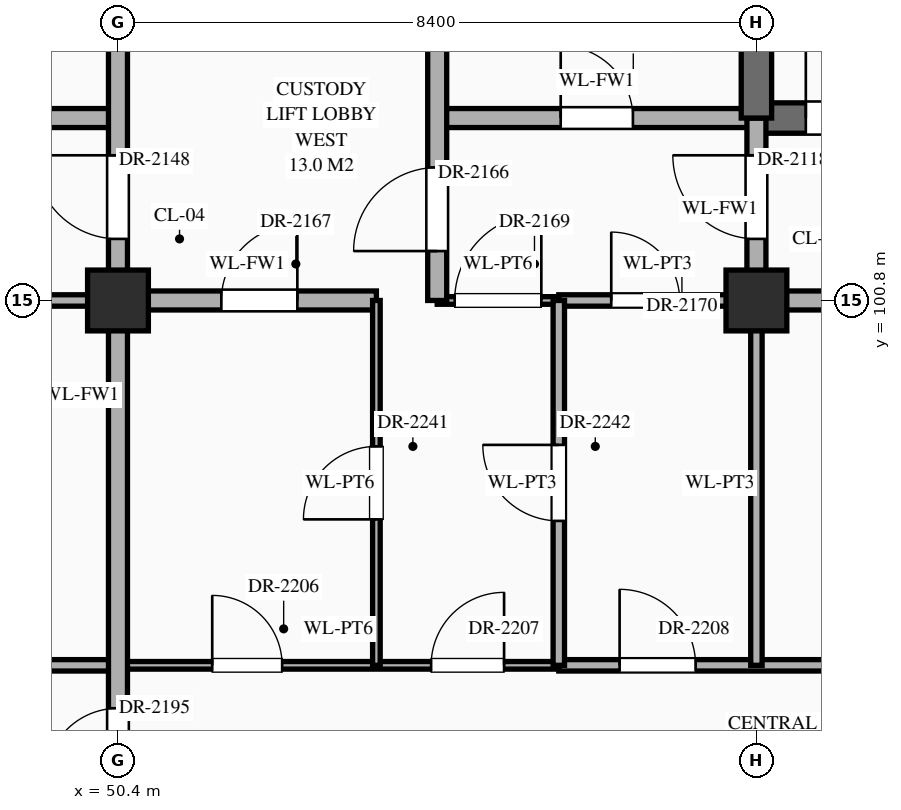
"""IFC4 building model, lengths in metres.
Left out: names, types, materials, properties, quantities, classifications, styles, units other than length and angle.
Written with IfcOpenShell. Run it as: python <this file> out.ifc"""

import sys

from ifc_helpers import new_model, si_unit, direction, frame, frame_2d, origin, origin_2d, place, context, subcontext, project, spatial, rectangle, extrude, element, fill, save


model = new_model("IFC4")
c1 = context("Model", 3, precision=1e-05, world=origin(), true_north=direction((0.0, 1.0)))
c2 = subcontext(c1, "Body", "Model", "MODEL_VIEW")
j1 = project(units=[si_unit("LENGTHUNIT", "METRE"), si_unit("PLANEANGLEUNIT", "RADIAN")], contexts=[c1])
p1 = place(None, origin())
s1 = spatial("IfcSite", under=j1, at=p1, CompositionType="ELEMENT")
p2 = place(p1, origin())
s2 = spatial("IfcBuilding", under=s1, at=p2, CompositionType="ELEMENT")
p3 = place(p2, frame((0.0, 0.0, 26.1)))
s3 = spatial("IfcBuildingStorey", under=s2, at=p3, CompositionType="ELEMENT", Elevation=26.1)
for number, where, z_axis, x_axis in (
    (1, (50.4, 100.8, 0.0), (0.0, 0.0, 1.0), (1.0, 0.0, 0.0)),
    (2, (58.8, 100.8, 0.0), (0.0, 0.0, 1.0), (1.0, 0.0, 0.0)),
):
    element("IfcColumn", number, at=place(p3, frame(where, z_axis=z_axis, x_axis=x_axis)), inside=s3, PredefinedType="COLUMN", context=c2, shape_type="SweptSolid", body=[
        extrude(rectangle(XDim=0.8, YDim=0.8, at=origin_2d()), origin(), (0.0, 0.0, 1.0), 4.5),
    ])
p4 = place(p3, frame((31.0, 96.0, 0.0), z_axis=(0.0, 0.0, 1.0), x_axis=(1.0, 0.0, 0.0)))
e3 = element("IfcWall", 3, at=p4, inside=s3, PredefinedType="STANDARD", context=c2, shape_type="SweptSolid", body=[
    extrude(rectangle(XDim=19.4, YDim=0.15, at=frame_2d((9.7, 0.0))), origin(), (0.0, 0.0, 1.0), 4.24),
])
p5 = place(p4, frame((0.66, 0.0, 0.0)))
e4 = element("IfcOpeningElement", 4, at=p5, cuts=e3, PredefinedType="OPENING", context=c2, shape_type="SweptSolid", body=[
    extrude(rectangle(XDim=1.28, YDim=2.35, at=frame_2d((0.64, 1.175))), frame((0.0, 0.087, 0.0), z_axis=(0.0, -1.0, 0.0), x_axis=(1.0, 0.0, 0.0)), (0.0, 0.0, 1.0), 0.174),
])
p6 = place(p4, frame((6.33, 0.0, 0.0)))
e5 = element("IfcOpeningElement", 5, at=p6, cuts=e3, PredefinedType="OPENING", context=c2, shape_type="SweptSolid", body=[
    extrude(rectangle(XDim=0.94, YDim=2.3, at=frame_2d((0.47, 1.15))), frame((0.0, 0.087, 0.0), z_axis=(0.0, -1.0, 0.0), x_axis=(1.0, 0.0, 0.0)), (0.0, 0.0, 1.0), 0.174),
])
p7 = place(p4, frame((14.71, 0.0, 0.0)))
e6 = element("IfcOpeningElement", 6, at=p7, cuts=e3, PredefinedType="OPENING", context=c2, shape_type="SweptSolid", body=[
    extrude(rectangle(XDim=0.98, YDim=2.35, at=frame_2d((0.49, 1.175))), frame((0.0, 0.087, 0.0), z_axis=(0.0, -1.0, 0.0), x_axis=(1.0, 0.0, 0.0)), (0.0, 0.0, 1.0), 0.174),
])
p8 = place(p3, frame((50.4, 96.0, 0.0), z_axis=(0.0, 0.0, 1.0), x_axis=(1.0, 0.0, 0.0)))
e7 = element("IfcWall", 7, at=p8, inside=s3, PredefinedType="STANDARD", context=c2, shape_type="SweptSolid", body=[
    extrude(rectangle(XDim=5.8, YDim=0.1, at=frame_2d((2.9, 0.0))), origin(), (0.0, 0.0, 1.0), 4.24),
])
p9 = place(p8, frame((1.24, 0.0, 0.0)))
e8 = element("IfcOpeningElement", 8, at=p9, cuts=e7, PredefinedType="OPENING", context=c2, shape_type="SweptSolid", body=[
    extrude(rectangle(XDim=0.92, YDim=2.15, at=frame_2d((0.46, 1.075))), frame((0.0, 0.062, 0.0), z_axis=(0.0, -1.0, 0.0), x_axis=(1.0, 0.0, 0.0)), (0.0, 0.0, 1.0), 0.124),
])
p10 = place(p8, frame((4.12, 0.0, 0.0)))
e9 = element("IfcOpeningElement", 9, at=p10, cuts=e7, PredefinedType="OPENING", context=c2, shape_type="SweptSolid", body=[
    extrude(rectangle(XDim=0.96, YDim=2.2, at=frame_2d((0.48, 1.1))), frame((0.0, 0.062, 0.0), z_axis=(0.0, -1.0, 0.0), x_axis=(1.0, 0.0, 0.0)), (0.0, 0.0, 1.0), 0.124),
])
p11 = place(p3, frame((56.2, 96.0, 0.0), z_axis=(0.0, 0.0, 1.0), x_axis=(1.0, 0.0, 0.0)))
e10 = element("IfcWall", 10, at=p11, inside=s3, PredefinedType="STANDARD", context=c2, shape_type="SweptSolid", body=[
    extrude(rectangle(XDim=27.8, YDim=0.15, at=frame_2d((13.9, 0.0))), origin(), (0.0, 0.0, 1.0), 4.24),
])
p12 = place(p11, frame((0.8, 0.0, 0.0)))
e11 = element("IfcOpeningElement", 11, at=p12, cuts=e10, PredefinedType="OPENING", context=c2, shape_type="SweptSolid", body=[
    extrude(rectangle(XDim=1.0, YDim=2.25, at=frame_2d((0.5, 1.125))), frame((0.0, 0.087, 0.0), z_axis=(0.0, -1.0, 0.0), x_axis=(1.0, 0.0, 0.0)), (0.0, 0.0, 1.0), 0.174),
])
p13 = place(p11, frame((6.28, 0.0, 0.0)))
e12 = element("IfcOpeningElement", 12, at=p13, cuts=e10, PredefinedType="OPENING", context=c2, shape_type="SweptSolid", body=[
    extrude(rectangle(XDim=1.04, YDim=2.2, at=frame_2d((0.52, 1.1))), frame((0.0, 0.087, 0.0), z_axis=(0.0, -1.0, 0.0), x_axis=(1.0, 0.0, 0.0)), (0.0, 0.0, 1.0), 0.174),
])
p14 = place(p11, frame((14.66, 0.0, 0.0)))
e13 = element("IfcOpeningElement", 13, at=p14, cuts=e10, PredefinedType="OPENING", context=c2, shape_type="SweptSolid", body=[
    extrude(rectangle(XDim=1.08, YDim=2.25, at=frame_2d((0.54, 1.125))), frame((0.0, 0.087, 0.0), z_axis=(0.0, -1.0, 0.0), x_axis=(1.0, 0.0, 0.0)), (0.0, 0.0, 1.0), 0.174),
])
p15 = place(p11, frame((23.04, 0.0, 0.0)))
e14 = element("IfcOpeningElement", 14, at=p15, cuts=e10, PredefinedType="OPENING", context=c2, shape_type="SweptSolid", body=[
    extrude(rectangle(XDim=1.12, YDim=2.25, at=frame_2d((0.56, 1.125))), frame((0.0, 0.087, 0.0), z_axis=(0.0, -1.0, 0.0), x_axis=(1.0, 0.0, 0.0)), (0.0, 0.0, 1.0), 0.174),
])
p16 = place(p3, frame((46.2, 100.8, 0.0), z_axis=(0.0, 0.0, 1.0), x_axis=(1.0, 0.0, 0.0)))
e15 = element("IfcWall", 15, at=p16, inside=s3, PredefinedType="STANDARD", context=c2, shape_type="SweptSolid", body=[
    extrude(rectangle(XDim=4.2, YDim=0.15, at=frame_2d((2.1, 0.0))), origin(), (0.0, 0.0, 1.0), 3.39),
])
p17 = place(p16, frame((1.45, 0.0, 0.0)))
e16 = element("IfcOpeningElement", 16, at=p17, cuts=e15, PredefinedType="OPENING", context=c2, shape_type="SweptSolid", body=[
    extrude(rectangle(XDim=0.98, YDim=2.35, at=frame_2d((0.49, 1.175))), frame((0.0, 0.087, 0.0), z_axis=(0.0, -1.0, 0.0), x_axis=(1.0, 0.0, 0.0)), (0.0, 0.0, 1.0), 0.174),
])
p18 = place(p3, frame((50.4, 100.8, 0.0), z_axis=(0.0, 0.0, 1.0), x_axis=(1.0, 0.0, 0.0)))
e17 = element("IfcWall", 17, at=p18, inside=s3, PredefinedType="STANDARD", context=c2, shape_type="SweptSolid", body=[
    extrude(rectangle(XDim=3.4, YDim=0.25, at=frame_2d((1.7, 0.0))), origin(), (0.0, 0.0, 1.0), 3.39),
])
p19 = place(p18, frame((1.36, 0.0, 0.0)))
e18 = element("IfcOpeningElement", 18, at=p19, cuts=e17, PredefinedType="OPENING", context=c2, shape_type="SweptSolid", body=[
    extrude(rectangle(XDim=1.0, YDim=2.2, at=frame_2d((0.5, 1.1))), frame((0.0, 0.137, 0.0), z_axis=(0.0, -1.0, 0.0), x_axis=(1.0, 0.0, 0.0)), (0.0, 0.0, 1.0), 0.274),
])
p20 = place(p3, frame((54.6, 100.8, 0.0), z_axis=(0.0, 0.0, 1.0), x_axis=(1.0, 0.0, 0.0)))
e19 = element("IfcWall", 19, at=p20, inside=s3, PredefinedType="STANDARD", context=c2, shape_type="SweptSolid", body=[
    extrude(rectangle(XDim=1.6, YDim=0.1, at=frame_2d((0.8, 0.0))), origin(), (0.0, 0.0, 1.0), 3.39),
])
p21 = place(p20, frame((0.23, 0.0, 0.0)))
e20 = element("IfcOpeningElement", 20, at=p21, cuts=e19, PredefinedType="OPENING", context=c2, shape_type="SweptSolid", body=[
    extrude(rectangle(XDim=1.14, YDim=2.4, at=frame_2d((0.57, 1.2))), frame((0.0, 0.062, 0.0), z_axis=(0.0, -1.0, 0.0), x_axis=(1.0, 0.0, 0.0)), (0.0, 0.0, 1.0), 0.124),
])
p22 = place(p3, frame((56.2, 100.8, 0.0), z_axis=(0.0, 0.0, 1.0), x_axis=(1.0, 0.0, 0.0)))
e21 = element("IfcWall", 21, at=p22, inside=s3, PredefinedType="STANDARD", context=c2, shape_type="SweptSolid", body=[
    extrude(rectangle(XDim=2.6, YDim=0.15, at=frame_2d((1.3, 0.0))), origin(), (0.0, 0.0, 1.0), 3.39),
])
p23 = place(p22, frame((0.69, 0.0, 0.0)))
e22 = element("IfcOpeningElement", 22, at=p23, cuts=e21, PredefinedType="OPENING", context=c2, shape_type="SweptSolid", body=[
    extrude(rectangle(XDim=0.9, YDim=2.15, at=frame_2d((0.45, 1.075))), frame((0.0, 0.087, 0.0), z_axis=(0.0, -1.0, 0.0), x_axis=(1.0, 0.0, 0.0)), (0.0, 0.0, 1.0), 0.174),
])
p24 = place(p3, frame((58.8, 100.8, 0.0), z_axis=(0.0, 0.0, 1.0), x_axis=(1.0, 0.0, 0.0)))
e23 = element("IfcWall", 23, at=p24, inside=s3, PredefinedType="STANDARD", context=c2, shape_type="SweptSolid", body=[
    extrude(rectangle(XDim=12.6, YDim=0.25, at=frame_2d((6.3, 0.0))), origin(), (0.0, 0.0, 1.0), 3.39),
])
p25 = place(p24, frame((3.7, 0.0, 0.0)))
e24 = element("IfcOpeningElement", 24, at=p25, cuts=e23, PredefinedType="OPENING", context=c2, shape_type="SweptSolid", body=[
    extrude(rectangle(XDim=1.0, YDim=2.2, at=frame_2d((0.5, 1.1))), frame((0.0, 0.137, 0.0), z_axis=(0.0, -1.0, 0.0), x_axis=(1.0, 0.0, 0.0)), (0.0, 0.0, 1.0), 0.274),
])
p26 = place(p3, frame((46.2, 103.2, 0.0), z_axis=(0.0, 0.0, 1.0), x_axis=(1.0, 0.0, 0.0)))
e25 = element("IfcWall", 25, at=p26, inside=s3, PredefinedType="STANDARD", context=c2, shape_type="SweptSolid", body=[
    extrude(rectangle(XDim=4.2, YDim=0.25, at=frame_2d((2.1, 0.0))), origin(), (0.0, 0.0, 1.0), 4.24),
])
p27 = place(p26, frame((1.625, 0.0, 0.0)))
e26 = element("IfcOpeningElement", 26, at=p27, cuts=e25, PredefinedType="OPENING", context=c2, shape_type="SweptSolid", body=[
    extrude(rectangle(XDim=0.95, YDim=2.15, at=frame_2d((0.475, 1.075))), frame((0.0, 0.137, 0.0), z_axis=(0.0, -1.0, 0.0), x_axis=(1.0, 0.0, 0.0)), (0.0, 0.0, 1.0), 0.274),
])
p28 = place(p3, frame((54.6, 103.2, 0.0), z_axis=(0.0, 0.0, 1.0), x_axis=(1.0, 0.0, 0.0)))
e27 = element("IfcWall", 27, at=p28, inside=s3, PredefinedType="STANDARD", context=c2, shape_type="SweptSolid", body=[
    extrude(rectangle(XDim=4.2, YDim=0.25, at=frame_2d((2.1, 0.0))), origin(), (0.0, 0.0, 1.0), 4.24),
])
p29 = place(p28, frame((1.625, 0.0, 0.0)))
e28 = element("IfcOpeningElement", 28, at=p29, cuts=e27, PredefinedType="OPENING", context=c2, shape_type="SweptSolid", body=[
    extrude(rectangle(XDim=0.95, YDim=2.15, at=frame_2d((0.475, 1.075))), frame((0.0, 0.137, 0.0), z_axis=(0.0, -1.0, 0.0), x_axis=(1.0, 0.0, 0.0)), (0.0, 0.0, 1.0), 0.274),
])
p30 = place(p3, frame((58.8, 103.2, 0.0), z_axis=(0.0, 0.0, 1.0), x_axis=(1.0, 0.0, 0.0)))
e29 = element("IfcWall", 29, at=p30, inside=s3, PredefinedType="SHEAR", context=c2, shape_type="SweptSolid", body=[
    extrude(rectangle(XDim=8.4, YDim=0.4, at=frame_2d((4.2, 0.0))), origin(), (0.0, 0.0, 1.0), 4.24),
])
p31 = place(p30, frame((0.65, 0.0, 0.0)))
e30 = element("IfcOpeningElement", 30, at=p31, cuts=e29, PredefinedType="OPENING", context=c2, shape_type="SweptSolid", body=[
    extrude(rectangle(XDim=1.1, YDim=2.2, at=frame_2d((0.55, 1.1))), frame((0.0, 0.212, 0.0), z_axis=(0.0, -1.0, 0.0), x_axis=(1.0, 0.0, 0.0)), (0.0, 0.0, 1.0), 0.424),
])
p32 = place(p3, frame((50.4, 91.2, 0.0), z_axis=(0.0, 0.0, 1.0), x_axis=(0.0, 1.0, 0.0)))
e31 = element("IfcWall", 31, at=p32, inside=s3, PredefinedType="STANDARD", context=c2, shape_type="SweptSolid", body=[
    extrude(rectangle(XDim=13.2, YDim=0.25, at=frame_2d((6.6, 0.0))), origin(), (0.0, 0.0, 1.0), 3.49),
])
p33 = place(p32, frame((0.54, 0.0, 0.0)))
e32 = element("IfcOpeningElement", 32, at=p33, cuts=e31, PredefinedType="OPENING", context=c2, shape_type="SweptSolid", body=[
    extrude(rectangle(XDim=1.0, YDim=2.2, at=frame_2d((0.5, 1.1))), frame((0.0, 0.137, 0.0), z_axis=(0.0, -1.0, 0.0), x_axis=(1.0, 0.0, 0.0)), (0.0, 0.0, 1.0), 0.274),
])
p34 = place(p32, frame((10.41, 0.0, 0.0)))
e33 = element("IfcOpeningElement", 33, at=p34, cuts=e31, PredefinedType="OPENING", context=c2, shape_type="SweptSolid", body=[
    extrude(rectangle(XDim=1.1, YDim=2.2, at=frame_2d((0.55, 1.1))), frame((0.0, 0.137, 0.0), z_axis=(0.0, -1.0, 0.0), x_axis=(1.0, 0.0, 0.0)), (0.0, 0.0, 1.0), 0.274),
])
p35 = place(p32, frame((3.285, 0.0, 0.0)))
e34 = element("IfcOpeningElement", 34, at=p35, cuts=e31, PredefinedType="OPENING", context=c2, shape_type="SweptSolid", body=[
    extrude(rectangle(XDim=0.95, YDim=2.15, at=frame_2d((0.475, 1.075))), frame((0.0, 0.137, 0.0), z_axis=(0.0, -1.0, 0.0), x_axis=(1.0, 0.0, 0.0)), (0.0, 0.0, 1.0), 0.274),
])
p36 = place(p3, frame((53.8, 96.0, 0.0), z_axis=(0.0, 0.0, 1.0), x_axis=(0.0, 1.0, 0.0)))
e35 = element("IfcWall", 35, at=p36, inside=s3, PredefinedType="STANDARD", context=c2, shape_type="SweptSolid", body=[
    extrude(rectangle(XDim=4.8, YDim=0.1, at=frame_2d((2.4, 0.0))), origin(), (0.0, 0.0, 1.0), 4.24),
])
p37 = place(p36, frame((1.92, 0.0, 0.0)))
e36 = element("IfcOpeningElement", 36, at=p37, cuts=e35, PredefinedType="OPENING", context=c2, shape_type="SweptSolid", body=[
    extrude(rectangle(XDim=0.96, YDim=2.2, at=frame_2d((0.48, 1.1))), frame((0.0, 0.062, 0.0), z_axis=(0.0, -1.0, 0.0), x_axis=(1.0, 0.0, 0.0)), (0.0, 0.0, 1.0), 0.124),
])
p38 = place(p3, frame((54.6, 100.8, 0.0), z_axis=(0.0, 0.0, 1.0), x_axis=(0.0, 1.0, 0.0)))
e37 = element("IfcWall", 37, at=p38, inside=s3, PredefinedType="STANDARD", context=c2, shape_type="SweptSolid", body=[
    extrude(rectangle(XDim=3.6, YDim=0.25, at=frame_2d((1.8, 0.0))), origin(), (0.0, 0.0, 1.0), 3.94),
])
p39 = place(p38, frame((0.65, 0.0, 0.0)))
e38 = element("IfcOpeningElement", 38, at=p39, cuts=e37, PredefinedType="OPENING", context=c2, shape_type="SweptSolid", body=[
    extrude(rectangle(XDim=1.1, YDim=2.2, at=frame_2d((0.55, 1.1))), frame((0.0, 0.137, 0.0), z_axis=(0.0, -1.0, 0.0), x_axis=(1.0, 0.0, 0.0)), (0.0, 0.0, 1.0), 0.274),
])
p40 = place(p3, frame((56.2, 96.0, 0.0), z_axis=(0.0, 0.0, 1.0), x_axis=(0.0, 1.0, 0.0)))
e39 = element("IfcWall", 39, at=p40, inside=s3, PredefinedType="STANDARD", context=c2, shape_type="SweptSolid", body=[
    extrude(rectangle(XDim=4.8, YDim=0.15, at=frame_2d((2.4, 0.0))), origin(), (0.0, 0.0, 1.0), 4.24),
])
p41 = place(p40, frame((1.9, 0.0, 0.0)))
e40 = element("IfcOpeningElement", 40, at=p41, cuts=e39, PredefinedType="OPENING", context=c2, shape_type="SweptSolid", body=[
    extrude(rectangle(XDim=1.0, YDim=2.25, at=frame_2d((0.5, 1.125))), frame((0.0, 0.087, 0.0), z_axis=(0.0, -1.0, 0.0), x_axis=(1.0, 0.0, 0.0)), (0.0, 0.0, 1.0), 0.174),
])
p42 = place(p3, frame((58.8, 96.0, 0.0), z_axis=(0.0, 0.0, 1.0), x_axis=(0.0, 1.0, 0.0)))
e41 = element("IfcWall", 41, at=p42, inside=s3, PredefinedType="STANDARD", context=c2, shape_type="SweptSolid", body=[
    extrude(rectangle(XDim=4.8, YDim=0.15, at=frame_2d((2.4, 0.0))), origin(), (0.0, 0.0, 1.0), 3.49),
])
p43 = place(p3, frame((58.8, 100.8, 0.0), z_axis=(0.0, 0.0, 1.0), x_axis=(0.0, 1.0, 0.0)))
e42 = element("IfcWall", 42, at=p43, inside=s3, PredefinedType="STANDARD", context=c2, shape_type="SweptSolid", body=[
    extrude(rectangle(XDim=2.4, YDim=0.25, at=frame_2d((1.2, 0.0))), origin(), (0.0, 0.0, 1.0), 3.49),
])
p44 = place(p43, frame((0.81, 0.0, 0.0)))
e43 = element("IfcOpeningElement", 43, at=p44, cuts=e42, PredefinedType="OPENING", context=c2, shape_type="SweptSolid", body=[
    extrude(rectangle(XDim=1.1, YDim=2.2, at=frame_2d((0.55, 1.1))), frame((0.0, 0.137, 0.0), z_axis=(0.0, -1.0, 0.0), x_axis=(1.0, 0.0, 0.0)), (0.0, 0.0, 1.0), 0.274),
])
p45 = place(p3, frame((58.8, 103.2, 0.0), z_axis=(0.0, 0.0, 1.0), x_axis=(0.0, 1.0, 0.0)))
e44 = element("IfcWall", 44, at=p45, inside=s3, PredefinedType="SHEAR", context=c2, shape_type="SweptSolid", body=[
    extrude(rectangle(XDim=4.8, YDim=0.4, at=frame_2d((2.4, 0.0))), origin(), (0.0, 0.0, 1.0), 4.24),
])
p46 = place(p31, origin())
e45 = element("IfcDoor", 45, at=p46, inside=s3, OperationType="SINGLE_SWING_LEFT", PredefinedType="DOOR", context=c2, shape_type="SweptSolid", body=[
    extrude(rectangle(XDim=1.1, YDim=2.2, at=frame_2d((0.55, 1.1))), frame((0.0, 0.025, 0.0), z_axis=(0.0, -1.0, 0.0), x_axis=(1.0, 0.0, 0.0)), (0.0, 0.0, 1.0), 0.05),
])
fill(e30, e45)
p47 = place(p44, origin())
e46 = element("IfcDoor", 46, at=p47, inside=s3, OperationType="SINGLE_SWING_RIGHT", PredefinedType="DOOR", context=c2, shape_type="SweptSolid", body=[
    extrude(rectangle(XDim=1.1, YDim=2.2, at=frame_2d((0.55, 1.1))), frame((0.0, 0.025, 0.0), z_axis=(0.0, -1.0, 0.0), x_axis=(1.0, 0.0, 0.0)), (0.0, 0.0, 1.0), 0.05),
])
fill(e43, e46)
p48 = place(p34, origin())
e47 = element("IfcDoor", 47, at=p48, inside=s3, OperationType="SINGLE_SWING_RIGHT", PredefinedType="DOOR", context=c2, shape_type="SweptSolid", body=[
    extrude(rectangle(XDim=1.1, YDim=2.2, at=frame_2d((0.55, 1.1))), frame((0.0, 0.025, 0.0), z_axis=(0.0, -1.0, 0.0), x_axis=(1.0, 0.0, 0.0)), (0.0, 0.0, 1.0), 0.05),
])
fill(e33, e47)
p49 = place(p39, origin())
e48 = element("IfcDoor", 48, at=p49, inside=s3, OperationType="SINGLE_SWING_LEFT", PredefinedType="DOOR", context=c2, shape_type="SweptSolid", body=[
    extrude(rectangle(XDim=1.1, YDim=2.2, at=frame_2d((0.55, 1.1))), frame((0.0, 0.025, 0.0), z_axis=(0.0, -1.0, 0.0), x_axis=(1.0, 0.0, 0.0)), (0.0, 0.0, 1.0), 0.05),
])
fill(e38, e48)
p50 = place(p19, origin())
e49 = element("IfcDoor", 49, at=p50, inside=s3, OperationType="SINGLE_SWING_RIGHT", PredefinedType="DOOR", context=c2, shape_type="SweptSolid", body=[
    extrude(rectangle(XDim=1.0, YDim=2.2, at=frame_2d((0.5, 1.1))), frame((0.0, 0.025, 0.0), z_axis=(0.0, -1.0, 0.0), x_axis=(1.0, 0.0, 0.0)), (0.0, 0.0, 1.0), 0.05),
])
fill(e18, e49)
p51 = place(p29, origin())
e50 = element("IfcDoor", 50, at=p51, inside=s3, OperationType="SINGLE_SWING_LEFT", PredefinedType="DOOR", context=c2, shape_type="SweptSolid", body=[
    extrude(rectangle(XDim=0.95, YDim=2.15, at=frame_2d((0.475, 1.075))), frame((0.0, 0.025, 0.0), z_axis=(0.0, -1.0, 0.0), x_axis=(1.0, 0.0, 0.0)), (0.0, 0.0, 1.0), 0.05),
])
fill(e28, e50)
p52 = place(p21, origin())
e51 = element("IfcDoor", 51, at=p52, inside=s3, OperationType="SINGLE_SWING_RIGHT", PredefinedType="DOOR", context=c2, shape_type="SweptSolid", body=[
    extrude(rectangle(XDim=1.14, YDim=2.4, at=frame_2d((0.57, 1.2))), frame((0.0, 0.025, 0.0), z_axis=(0.0, -1.0, 0.0), x_axis=(1.0, 0.0, 0.0)), (0.0, 0.0, 1.0), 0.05),
])
fill(e20, e51)
p53 = place(p23, origin())
e52 = element("IfcDoor", 52, at=p53, inside=s3, OperationType="SINGLE_SWING_LEFT", PredefinedType="DOOR", context=c2, shape_type="SweptSolid", body=[
    extrude(rectangle(XDim=0.9, YDim=2.15, at=frame_2d((0.45, 1.075))), frame((0.0, 0.025, 0.0), z_axis=(0.0, -1.0, 0.0), x_axis=(1.0, 0.0, 0.0)), (0.0, 0.0, 1.0), 0.05),
])
fill(e22, e52)
p54 = place(p35, origin())
e53 = element("IfcDoor", 53, at=p54, inside=s3, OperationType="SINGLE_SWING_LEFT", PredefinedType="DOOR", context=c2, shape_type="SweptSolid", body=[
    extrude(rectangle(XDim=0.95, YDim=2.15, at=frame_2d((0.475, 1.075))), frame((0.0, 0.025, 0.0), z_axis=(0.0, -1.0, 0.0), x_axis=(1.0, 0.0, 0.0)), (0.0, 0.0, 1.0), 0.05),
])
fill(e34, e53)
p55 = place(p9, origin())
e54 = element("IfcDoor", 54, at=p55, inside=s3, OperationType="SINGLE_SWING_LEFT", PredefinedType="DOOR", context=c2, shape_type="SweptSolid", body=[
    extrude(rectangle(XDim=0.92, YDim=2.15, at=frame_2d((0.46, 1.075))), frame((0.0, 0.025, 0.0), z_axis=(0.0, -1.0, 0.0), x_axis=(1.0, 0.0, 0.0)), (0.0, 0.0, 1.0), 0.05),
])
fill(e8, e54)
p56 = place(p10, origin())
e55 = element("IfcDoor", 55, at=p56, inside=s3, OperationType="SINGLE_SWING_RIGHT", PredefinedType="DOOR", context=c2, shape_type="SweptSolid", body=[
    extrude(rectangle(XDim=0.96, YDim=2.2, at=frame_2d((0.48, 1.1))), frame((0.0, 0.025, 0.0), z_axis=(0.0, -1.0, 0.0), x_axis=(1.0, 0.0, 0.0)), (0.0, 0.0, 1.0), 0.05),
])
fill(e9, e55)
p57 = place(p12, origin())
e56 = element("IfcDoor", 56, at=p57, inside=s3, OperationType="SINGLE_SWING_LEFT", PredefinedType="DOOR", context=c2, shape_type="SweptSolid", body=[
    extrude(rectangle(XDim=1.0, YDim=2.25, at=frame_2d((0.5, 1.125))), frame((0.0, 0.025, 0.0), z_axis=(0.0, -1.0, 0.0), x_axis=(1.0, 0.0, 0.0)), (0.0, 0.0, 1.0), 0.05),
])
fill(e11, e56)
p58 = place(p37, origin())
e57 = element("IfcDoor", 57, at=p58, inside=s3, OperationType="SINGLE_SWING_LEFT", PredefinedType="DOOR", context=c2, shape_type="SweptSolid", body=[
    extrude(rectangle(XDim=0.96, YDim=2.2, at=frame_2d((0.48, 1.1))), frame((0.0, 0.025, 0.0), z_axis=(0.0, -1.0, 0.0), x_axis=(1.0, 0.0, 0.0)), (0.0, 0.0, 1.0), 0.05),
])
fill(e36, e57)
p59 = place(p41, origin())
e58 = element("IfcDoor", 58, at=p59, inside=s3, OperationType="SINGLE_SWING_RIGHT", PredefinedType="DOOR", context=c2, shape_type="SweptSolid", body=[
    extrude(rectangle(XDim=1.0, YDim=2.25, at=frame_2d((0.5, 1.125))), frame((0.0, 0.025, 0.0), z_axis=(0.0, -1.0, 0.0), x_axis=(1.0, 0.0, 0.0)), (0.0, 0.0, 1.0), 0.05),
])
fill(e40, e58)
save(model, sys.argv[1])
